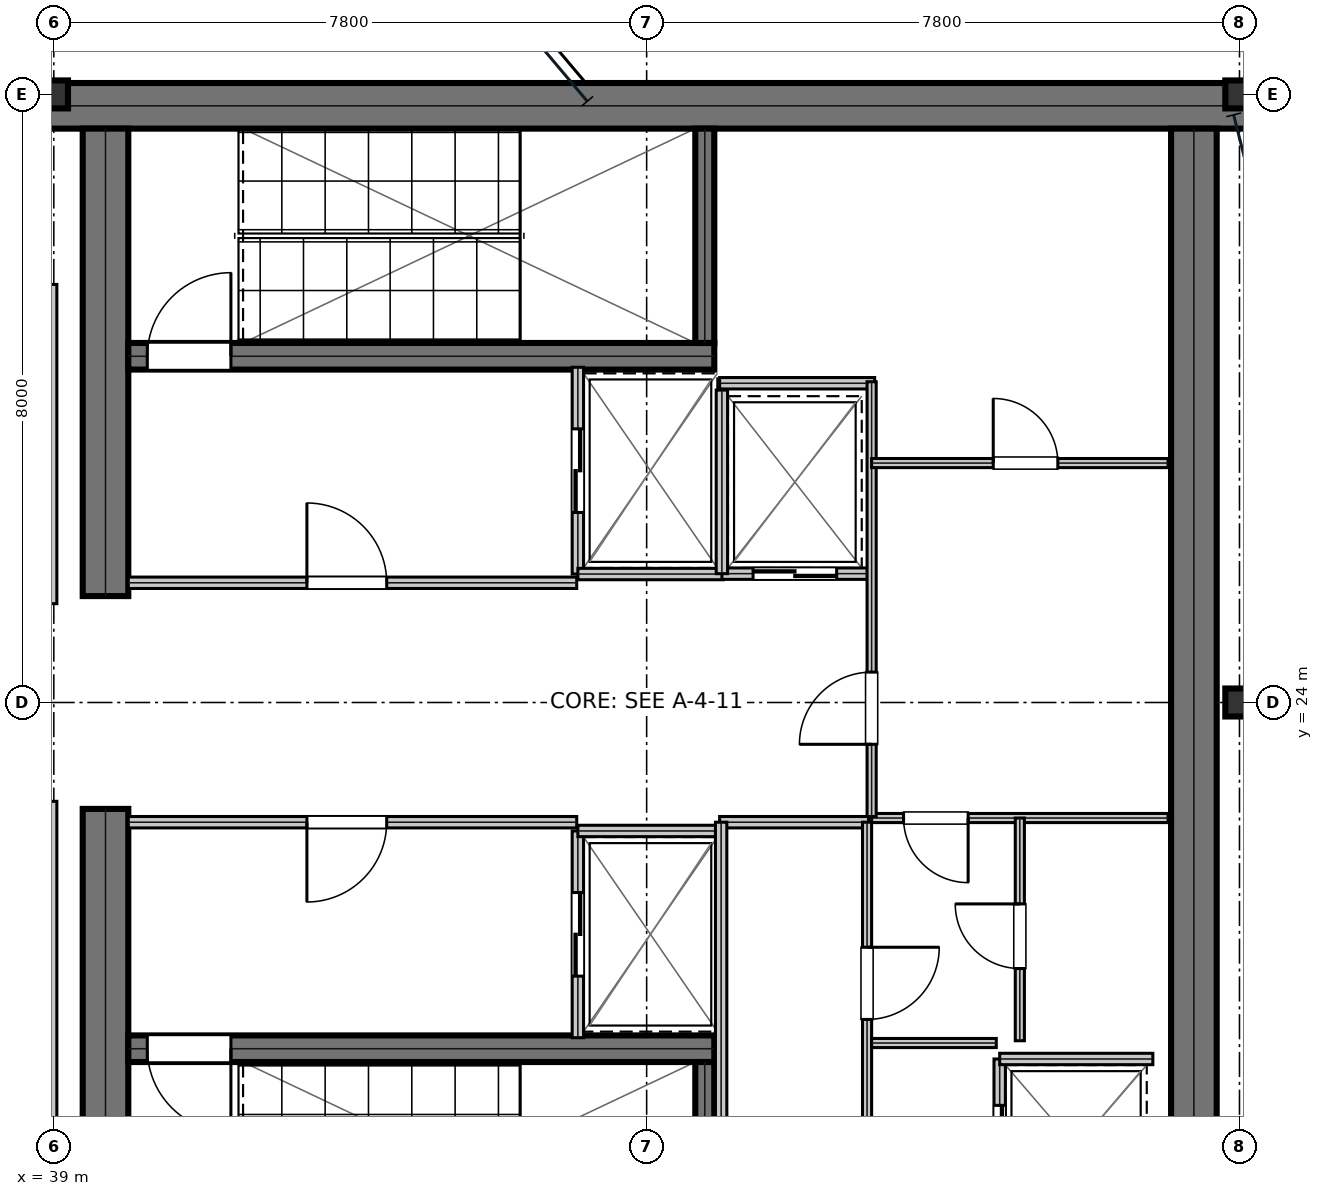
"""IFC4 building model, lengths in metres.
Left out: names, types, materials, properties, quantities, classifications, styles, units other than length and angle.
Written with IfcOpenShell. Run it as: python <this file> out.ifc"""

import sys

from ifc_helpers import new_model, si_unit, direction, frame, frame_2d, origin, origin_2d, place, context, subcontext, project, spatial, rectangle, i_section, extrude, element, fill, save


model = new_model("IFC4")
c1 = context("Model", 3, precision=1e-05, world=origin(), true_north=direction((0.0, 1.0)))
c2 = subcontext(c1, "Body", "Model", "MODEL_VIEW")
j1 = project(units=[si_unit("LENGTHUNIT", "METRE"), si_unit("PLANEANGLEUNIT", "RADIAN")], contexts=[c1])
p1 = place(None, origin())
s1 = spatial("IfcSite", under=j1, at=p1, CompositionType="ELEMENT")
p2 = place(p1, origin())
s2 = spatial("IfcBuilding", under=s1, at=p2, CompositionType="ELEMENT")
p3 = place(p2, frame((0.0, 0.0, 262.05)))
s3 = spatial("IfcBuildingStorey", under=s2, at=p3, CompositionType="ELEMENT", Elevation=262.05)
p4 = place(p3, frame((38.8, 31.85, 0.0), z_axis=(0.0, 0.0, 1.0), x_axis=(1.0, 0.0, 0.0)))
e1 = element("IfcWall", 1, at=p4, inside=s3, PredefinedType="SHEAR", context=c2, shape_type="SweptSolid", body=[
    extrude(rectangle(XDim=16.0, YDim=0.6, at=frame_2d((8.0, 0.0))), origin(), (0.0, 0.0, 1.0), 4.56),
])
for number, where, z_axis, x_axis in (
    (2, (39.68, 16.45, 0.0), (0.0, 0.0, 1.0), (0.0, 1.0, 0.0)),
    (3, (39.68, 25.4, 0.0), (0.0, 0.0, 1.0), (0.0, 1.0, 0.0)),
):
    element("IfcWall", number, at=place(p3, frame(where, z_axis=z_axis, x_axis=x_axis)), inside=s3, PredefinedType="SHEAR", context=c2, shape_type="SweptSolid", body=[
        extrude(rectangle(XDim=6.15, YDim=0.6, at=frame_2d((3.075, 0.0))), origin(), (0.0, 0.0, 1.0), 4.56),
    ])
p5 = place(p3, frame((54.0, 16.45, 0.0), z_axis=(0.0, 0.0, 1.0), x_axis=(0.0, 1.0, 0.0)))
e4 = element("IfcWall", 4, at=p5, inside=s3, PredefinedType="SHEAR", context=c2, shape_type="SweptSolid", body=[
    extrude(rectangle(XDim=15.1, YDim=0.6, at=frame_2d((7.55, 0.0))), origin(), (0.0, 0.0, 1.0), 4.56),
])
p6 = place(p3, frame((39.98, 28.555, 0.0), z_axis=(0.0, 0.0, 1.0), x_axis=(1.0, 0.0, 0.0)))
e5 = element("IfcWall", 5, at=p6, inside=s3, PredefinedType="SHEAR", context=c2, shape_type="SweptSolid", body=[
    extrude(rectangle(XDim=7.71, YDim=0.35, at=frame_2d((3.855, 0.0))), origin(), (0.0, 0.0, 1.0), 4.56),
])
p7 = place(p6, frame((0.25, 0.0, 0.0)))
e6 = element("IfcOpeningElement", 6, at=p7, cuts=e5, PredefinedType="OPENING", context=c2, shape_type="SweptSolid", body=[
    extrude(rectangle(XDim=1.1, YDim=2.15, at=frame_2d((0.55, 1.075))), frame((0.0, 0.185, 0.0), z_axis=(0.0, -1.0, 0.0), x_axis=(1.0, 0.0, 0.0)), (0.0, 0.0, 1.0), 0.37),
])
p8 = place(p3, frame((39.98, 19.445, 0.0), z_axis=(0.0, 0.0, 1.0), x_axis=(1.0, 0.0, 0.0)))
e7 = element("IfcWall", 7, at=p8, inside=s3, PredefinedType="SHEAR", context=c2, shape_type="SweptSolid", body=[
    extrude(rectangle(XDim=7.71, YDim=0.35, at=frame_2d((3.855, 0.0))), origin(), (0.0, 0.0, 1.0), 4.56),
])
p9 = place(p8, frame((0.25, 0.0, 0.0)))
e8 = element("IfcOpeningElement", 8, at=p9, cuts=e7, PredefinedType="OPENING", context=c2, shape_type="SweptSolid", body=[
    extrude(rectangle(XDim=1.1, YDim=2.15, at=frame_2d((0.55, 1.075))), frame((0.0, 0.185, 0.0), z_axis=(0.0, -1.0, 0.0), x_axis=(1.0, 0.0, 0.0)), (0.0, 0.0, 1.0), 0.37),
])
for number, where, z_axis, x_axis in (
    (9, (47.565, 28.73, 0.0), (0.0, 0.0, 1.0), (0.0, 1.0, 0.0)),
    (10, (47.565, 16.45, 0.0), (0.0, 0.0, 1.0), (0.0, 1.0, 0.0)),
):
    element("IfcWall", number, at=place(p3, frame(where, z_axis=z_axis, x_axis=x_axis)), inside=s3, PredefinedType="SHEAR", context=c2, shape_type="SweptSolid", body=[
        extrude(rectangle(XDim=2.82, YDim=0.25, at=frame_2d((1.41, 0.0))), origin(), (0.0, 0.0, 1.0), 4.56),
    ])
for number, where, z_axis, x_axis in (
    (11, (39.0, 32.0, 0.0), (0.0, 0.0, 1.0), (1.0, 0.0, 0.0)),
    (12, (54.6, 24.0, 0.0), (0.0, 0.0, 1.0), (1.0, 0.0, 0.0)),
    (13, (54.6, 32.0, 0.0), (0.0, 0.0, 1.0), (1.0, 0.0, 0.0)),
):
    element("IfcColumn", number, at=place(p3, frame(where, z_axis=z_axis, x_axis=x_axis)), inside=s3, PredefinedType="COLUMN", context=c2, shape_type="SweptSolid", body=[
        extrude(i_section(OverallWidth=0.373, OverallDepth=0.368, WebThickness=0.015, FlangeThickness=0.024, at=origin_2d()), origin(), (0.0, 0.0, 1.0), 4.794),
    ])
p10 = place(p3, frame((39.98, 25.575, 0.0), z_axis=(0.0, 0.0, 1.0), x_axis=(1.0, 0.0, 0.0)))
e14 = element("IfcWall", 14, at=p10, inside=s3, PredefinedType="PARTITIONING", context=c2, shape_type="SweptSolid", body=[
    extrude(rectangle(XDim=5.9, YDim=0.15, at=frame_2d((2.95, 0.0))), origin(), (0.0, 0.0, 1.0), 4.56),
])
p11 = place(p10, frame((2.35, 0.0, 0.0)))
e15 = element("IfcOpeningElement", 15, at=p11, cuts=e14, PredefinedType="OPENING", context=c2, shape_type="SweptSolid", body=[
    extrude(rectangle(XDim=1.05, YDim=2.15, at=frame_2d((0.525, 1.075))), frame((0.0, 0.085, 0.0), z_axis=(0.0, -1.0, 0.0), x_axis=(1.0, 0.0, 0.0)), (0.0, 0.0, 1.0), 0.17),
])
p12 = place(p3, frame((39.98, 22.425, 0.0), z_axis=(0.0, 0.0, 1.0), x_axis=(1.0, 0.0, 0.0)))
e16 = element("IfcWall", 16, at=p12, inside=s3, PredefinedType="PARTITIONING", context=c2, shape_type="SweptSolid", body=[
    extrude(rectangle(XDim=5.9, YDim=0.15, at=frame_2d((2.95, 0.0))), origin(), (0.0, 0.0, 1.0), 4.56),
])
p13 = place(p12, frame((2.35, 0.0, 0.0)))
e17 = element("IfcOpeningElement", 17, at=p13, cuts=e16, PredefinedType="OPENING", context=c2, shape_type="SweptSolid", body=[
    extrude(rectangle(XDim=1.05, YDim=2.15, at=frame_2d((0.525, 1.075))), frame((0.0, 0.085, 0.0), z_axis=(0.0, -1.0, 0.0), x_axis=(1.0, 0.0, 0.0)), (0.0, 0.0, 1.0), 0.17),
])
p14 = place(p3, frame((45.895, 25.69, 0.0), z_axis=(0.0, 0.0, 1.0), x_axis=(0.0, 1.0, 0.0)))
e18 = element("IfcWall", 18, at=p14, inside=s3, PredefinedType="PARTITIONING", context=c2, shape_type="SweptSolid", body=[
    extrude(rectangle(XDim=2.72, YDim=0.15, at=frame_2d((1.36, 0.0))), origin(), (0.0, 0.0, 1.0), 4.56),
])
p15 = place(p14, frame((0.81, 0.0, 0.0)))
e19 = element("IfcOpeningElement", 19, at=p15, cuts=e18, PredefinedType="OPENING", context=c2, shape_type="SweptSolid", body=[
    extrude(rectangle(XDim=1.1, YDim=2.15, at=frame_2d((0.55, 1.075))), frame((0.0, 0.085, 0.0), z_axis=(0.0, -1.0, 0.0), x_axis=(1.0, 0.0, 0.0)), (0.0, 0.0, 1.0), 0.17),
])
p16 = place(p3, frame((45.895, 25.69, 0.0), z_axis=(0.0, 0.0, 1.0), x_axis=(1.0, 0.0, 0.0)))
e20 = element("IfcWall", 20, at=p16, inside=s3, PredefinedType="PARTITIONING", context=c2, shape_type="SweptSolid", body=[
    extrude(rectangle(XDim=1.915, YDim=0.15, at=frame_2d((0.958, 0.0))), origin(), (0.0, 0.0, 1.0), 4.56),
])
p17 = place(p3, frame((45.895, 19.59, 0.0), z_axis=(0.0, 0.0, 1.0), x_axis=(0.0, 1.0, 0.0)))
e21 = element("IfcWall", 21, at=p17, inside=s3, PredefinedType="PARTITIONING", context=c2, shape_type="SweptSolid", body=[
    extrude(rectangle(XDim=2.72, YDim=0.15, at=frame_2d((1.36, 0.0))), origin(), (0.0, 0.0, 1.0), 4.56),
])
p18 = place(p17, frame((0.81, 0.0, 0.0)))
e22 = element("IfcOpeningElement", 22, at=p18, cuts=e21, PredefinedType="OPENING", context=c2, shape_type="SweptSolid", body=[
    extrude(rectangle(XDim=1.1, YDim=2.15, at=frame_2d((0.55, 1.075))), frame((0.0, 0.085, 0.0), z_axis=(0.0, -1.0, 0.0), x_axis=(1.0, 0.0, 0.0)), (0.0, 0.0, 1.0), 0.17),
])
p19 = place(p3, frame((45.895, 22.31, 0.0), z_axis=(0.0, 0.0, 1.0), x_axis=(1.0, 0.0, 0.0)))
e23 = element("IfcWall", 23, at=p19, inside=s3, PredefinedType="PARTITIONING", context=c2, shape_type="SweptSolid", body=[
    extrude(rectangle(XDim=1.915, YDim=0.15, at=frame_2d((0.958, 0.0))), origin(), (0.0, 0.0, 1.0), 4.56),
])
p20 = place(p3, frame((47.79, 25.695, 0.0), z_axis=(0.0, 0.0, 1.0), x_axis=(1.0, 0.0, 0.0)))
e24 = element("IfcWall", 24, at=p20, inside=s3, PredefinedType="PARTITIONING", context=c2, shape_type="SweptSolid", body=[
    extrude(rectangle(XDim=1.92, YDim=0.15, at=frame_2d((0.96, 0.0))), origin(), (0.0, 0.0, 1.0), 4.56),
])
p21 = place(p20, frame((0.41, 0.0, 0.0)))
e25 = element("IfcOpeningElement", 25, at=p21, cuts=e24, PredefinedType="OPENING", context=c2, shape_type="SweptSolid", body=[
    extrude(rectangle(XDim=1.1, YDim=2.15, at=frame_2d((0.55, 1.075))), frame((0.0, 0.085, 0.0), z_axis=(0.0, -1.0, 0.0), x_axis=(1.0, 0.0, 0.0)), (0.0, 0.0, 1.0), 0.17),
])
p22 = place(p3, frame((47.79, 25.695, 0.0), z_axis=(0.0, 0.0, 1.0), x_axis=(0.0, 1.0, 0.0)))
e26 = element("IfcWall", 26, at=p22, inside=s3, PredefinedType="PARTITIONING", context=c2, shape_type="SweptSolid", body=[
    extrude(rectangle(XDim=2.415, YDim=0.15, at=frame_2d((1.208, 0.0))), origin(), (0.0, 0.0, 1.0), 4.56),
])
p23 = place(p3, frame((51.445, 16.99, 0.0), z_axis=(0.0, 0.0, 1.0), x_axis=(0.0, 1.0, 0.0)))
e27 = element("IfcWall", 27, at=p23, inside=s3, PredefinedType="PARTITIONING", context=c2, shape_type="SweptSolid", body=[
    extrude(rectangle(XDim=2.32, YDim=0.15, at=frame_2d((1.16, 0.0))), origin(), (0.0, 0.0, 1.0), 4.56),
])
p24 = place(p23, frame((0.61, 0.0, 0.0)))
e28 = element("IfcOpeningElement", 28, at=p24, cuts=e27, PredefinedType="OPENING", context=c2, shape_type="SweptSolid", body=[
    extrude(rectangle(XDim=1.1, YDim=2.15, at=frame_2d((0.55, 1.075))), frame((0.0, 0.085, 0.0), z_axis=(0.0, -1.0, 0.0), x_axis=(1.0, 0.0, 0.0)), (0.0, 0.0, 1.0), 0.17),
])
p25 = place(p3, frame((51.445, 19.31, 0.0), z_axis=(0.0, 0.0, 1.0), x_axis=(1.0, 0.0, 0.0)))
e29 = element("IfcWall", 29, at=p25, inside=s3, PredefinedType="PARTITIONING", context=c2, shape_type="SweptSolid", body=[
    extrude(rectangle(XDim=2.015, YDim=0.15, at=frame_2d((1.007, 0.0))), origin(), (0.0, 0.0, 1.0), 4.56),
])
p26 = place(p3, frame((47.76, 22.425, 0.0), z_axis=(0.0, 0.0, 1.0), x_axis=(1.0, 0.0, 0.0)))
e30 = element("IfcWall", 30, at=p26, inside=s3, PredefinedType="PARTITIONING", context=c2, shape_type="SweptSolid", body=[
    extrude(rectangle(XDim=1.96, YDim=0.15, at=frame_2d((0.98, 0.0))), origin(), (0.0, 0.0, 1.0), 4.56),
])
p27 = place(p3, frame((47.78, 16.45, 0.0), z_axis=(0.0, 0.0, 1.0), x_axis=(0.0, 1.0, 0.0)))
e31 = element("IfcWall", 31, at=p27, inside=s3, PredefinedType="PARTITIONING", context=c2, shape_type="SweptSolid", body=[
    extrude(rectangle(XDim=5.975, YDim=0.15, at=frame_2d((2.988, 0.0))), origin(), (0.0, 0.0, 1.0), 4.56),
])
p28 = place(p3, frame((49.7, 16.48, 0.0), z_axis=(0.0, 0.0, 1.0), x_axis=(0.0, 1.0, 0.0)))
e32 = element("IfcWall", 32, at=p28, inside=s3, PredefinedType="PARTITIONING", context=c2, shape_type="SweptSolid", body=[
    extrude(rectangle(XDim=5.945, YDim=0.12, at=frame_2d((2.973, 0.0))), origin(), (0.0, 0.0, 1.0), 4.56),
])
p29 = place(p28, frame((3.35, 0.0, 0.0)))
e33 = element("IfcOpeningElement", 33, at=p29, cuts=e32, PredefinedType="OPENING", context=c2, shape_type="SweptSolid", body=[
    extrude(rectangle(XDim=0.95, YDim=2.15, at=frame_2d((0.475, 1.075))), frame((0.0, 0.07, 0.0), z_axis=(0.0, -1.0, 0.0), x_axis=(1.0, 0.0, 0.0)), (0.0, 0.0, 1.0), 0.14),
])
p30 = place(p3, frame((49.76, 22.48, 0.0), z_axis=(0.0, 0.0, 1.0), x_axis=(1.0, 0.0, 0.0)))
e34 = element("IfcWall", 34, at=p30, inside=s3, PredefinedType="PARTITIONING", context=c2, shape_type="SweptSolid", body=[
    extrude(rectangle(XDim=3.9, YDim=0.12, at=frame_2d((1.95, 0.0))), origin(), (0.0, 0.0, 1.0), 4.56),
])
p31 = place(p30, frame((0.42, 0.0, 0.0)))
e35 = element("IfcOpeningElement", 35, at=p31, cuts=e34, PredefinedType="OPENING", context=c2, shape_type="SweptSolid", body=[
    extrude(rectangle(XDim=0.85, YDim=2.15, at=frame_2d((0.425, 1.075))), frame((0.0, 0.07, 0.0), z_axis=(0.0, -1.0, 0.0), x_axis=(1.0, 0.0, 0.0)), (0.0, 0.0, 1.0), 0.14),
])
p32 = place(p3, frame((51.71, 19.55, 0.0), z_axis=(0.0, 0.0, 1.0), x_axis=(0.0, 1.0, 0.0)))
e36 = element("IfcWall", 36, at=p32, inside=s3, PredefinedType="PARTITIONING", context=c2, shape_type="SweptSolid", body=[
    extrude(rectangle(XDim=2.93, YDim=0.12, at=frame_2d((1.465, 0.0))), origin(), (0.0, 0.0, 1.0), 4.56),
])
p33 = place(p32, frame((0.95, 0.0, 0.0)))
e37 = element("IfcOpeningElement", 37, at=p33, cuts=e36, PredefinedType="OPENING", context=c2, shape_type="SweptSolid", body=[
    extrude(rectangle(XDim=0.85, YDim=2.15, at=frame_2d((0.425, 1.075))), frame((0.0, 0.07, 0.0), z_axis=(0.0, -1.0, 0.0), x_axis=(1.0, 0.0, 0.0)), (0.0, 0.0, 1.0), 0.14),
])
p34 = place(p3, frame((49.76, 19.52, 0.0), z_axis=(0.0, 0.0, 1.0), x_axis=(1.0, 0.0, 0.0)))
e38 = element("IfcWall", 38, at=p34, inside=s3, PredefinedType="PARTITIONING", context=c2, shape_type="SweptSolid", body=[
    extrude(rectangle(XDim=1.64, YDim=0.12, at=frame_2d((0.82, 0.0))), origin(), (0.0, 0.0, 1.0), 4.56),
])
p35 = place(p3, frame((47.76, 28.2, 0.0), z_axis=(0.0, 0.0, 1.0), x_axis=(1.0, 0.0, 0.0)))
e39 = element("IfcWall", 39, at=p35, inside=s3, PredefinedType="PARTITIONING", context=c2, shape_type="SweptSolid", body=[
    extrude(rectangle(XDim=2.04, YDim=0.15, at=frame_2d((1.02, 0.0))), origin(), (0.0, 0.0, 1.0), 4.56),
])
p36 = place(p3, frame((49.76, 22.5, 0.0), z_axis=(0.0, 0.0, 1.0), x_axis=(0.0, 1.0, 0.0)))
e40 = element("IfcWall", 40, at=p36, inside=s3, PredefinedType="PARTITIONING", context=c2, shape_type="SweptSolid", body=[
    extrude(rectangle(XDim=5.72, YDim=0.12, at=frame_2d((2.86, 0.0))), origin(), (0.0, 0.0, 1.0), 4.56),
])
p37 = place(p36, frame((0.95, 0.0, 0.0)))
e41 = element("IfcOpeningElement", 41, at=p37, cuts=e40, PredefinedType="OPENING", context=c2, shape_type="SweptSolid", body=[
    extrude(rectangle(XDim=0.95, YDim=2.15, at=frame_2d((0.475, 1.075))), frame((0.0, 0.07, 0.0), z_axis=(0.0, -1.0, 0.0), x_axis=(1.0, 0.0, 0.0)), (0.0, 0.0, 1.0), 0.14),
])
p38 = place(p3, frame((49.76, 27.15, 0.0), z_axis=(0.0, 0.0, 1.0), x_axis=(1.0, 0.0, 0.0)))
e42 = element("IfcWall", 42, at=p38, inside=s3, PredefinedType="PARTITIONING", context=c2, shape_type="SweptSolid", body=[
    extrude(rectangle(XDim=3.9, YDim=0.12, at=frame_2d((1.95, 0.0))), origin(), (0.0, 0.0, 1.0), 4.56),
])
p39 = place(p38, frame((1.6, 0.0, 0.0)))
e43 = element("IfcOpeningElement", 43, at=p39, cuts=e42, PredefinedType="OPENING", context=c2, shape_type="SweptSolid", body=[
    extrude(rectangle(XDim=0.85, YDim=2.15, at=frame_2d((0.425, 1.075))), frame((0.0, 0.07, 0.0), z_axis=(0.0, -1.0, 0.0), x_axis=(1.0, 0.0, 0.0)), (0.0, 0.0, 1.0), 0.14),
])
for number, where, z_axis, x_axis in (
    (44, (38.95, 18.5, 0.0), (0.0, 0.0, 1.0), (0.0, 1.0, 0.0)),
    (45, (38.95, 25.3, 0.0), (0.0, 0.0, 1.0), (0.0, 1.0, 0.0)),
):
    element("IfcWall", number, at=place(p3, frame(where, z_axis=z_axis, x_axis=x_axis)), inside=s3, PredefinedType="SOLIDWALL", context=c2, shape_type="SweptSolid", body=[
        extrude(rectangle(XDim=4.2, YDim=0.18, at=frame_2d((2.1, 0.0))), origin(), (0.0, 0.0, 1.0), 4.29),
    ])
p40 = place(p11, origin())
e46 = element("IfcDoor", 46, at=p40, inside=s3, OperationType="SINGLE_SWING_LEFT", PredefinedType="DOOR", context=c2, shape_type="SweptSolid", body=[
    extrude(rectangle(XDim=1.05, YDim=2.15, at=frame_2d((0.525, 1.075))), frame((0.0, 0.025, 0.0), z_axis=(0.0, -1.0, 0.0), x_axis=(1.0, 0.0, 0.0)), (0.0, 0.0, 1.0), 0.05),
])
fill(e15, e46)
p41 = place(p13, frame((1.05, 0.0, 0.0), z_axis=(0.0, 0.0, 1.0), x_axis=(-1.0, 0.0, 0.0)))
e47 = element("IfcDoor", 47, at=p41, inside=s3, OperationType="SINGLE_SWING_RIGHT", PredefinedType="DOOR", context=c2, shape_type="SweptSolid", body=[
    extrude(rectangle(XDim=1.05, YDim=2.15, at=frame_2d((0.525, 1.075))), frame((0.0, 0.025, 0.0), z_axis=(0.0, -1.0, 0.0), x_axis=(1.0, 0.0, 0.0)), (0.0, 0.0, 1.0), 0.05),
])
fill(e17, e47)
p42 = place(p15, frame((1.1, 0.0, 0.0), z_axis=(0.0, 0.0, 1.0), x_axis=(-1.0, 0.0, 0.0)))
e48 = element("IfcDoor", 48, at=p42, inside=s3, OperationType="DOUBLE_DOOR_SLIDING", PredefinedType="DOOR", context=c2, shape_type="SweptSolid", body=[
    extrude(rectangle(XDim=1.1, YDim=2.15, at=frame_2d((0.55, 1.075))), frame((0.0, 0.025, 0.0), z_axis=(0.0, -1.0, 0.0), x_axis=(1.0, 0.0, 0.0)), (0.0, 0.0, 1.0), 0.05),
])
fill(e19, e48)
p43 = place(p18, frame((1.1, 0.0, 0.0), z_axis=(0.0, 0.0, 1.0), x_axis=(-1.0, 0.0, 0.0)))
e49 = element("IfcDoor", 49, at=p43, inside=s3, OperationType="DOUBLE_DOOR_SLIDING", PredefinedType="DOOR", context=c2, shape_type="SweptSolid", body=[
    extrude(rectangle(XDim=1.1, YDim=2.15, at=frame_2d((0.55, 1.075))), frame((0.0, 0.025, 0.0), z_axis=(0.0, -1.0, 0.0), x_axis=(1.0, 0.0, 0.0)), (0.0, 0.0, 1.0), 0.05),
])
fill(e22, e49)
p44 = place(p21, frame((1.1, 0.0, 0.0), z_axis=(0.0, 0.0, 1.0), x_axis=(-1.0, 0.0, 0.0)))
e50 = element("IfcDoor", 50, at=p44, inside=s3, OperationType="DOUBLE_DOOR_SLIDING", PredefinedType="DOOR", context=c2, shape_type="SweptSolid", body=[
    extrude(rectangle(XDim=1.1, YDim=2.15, at=frame_2d((0.55, 1.075))), frame((0.0, 0.025, 0.0), z_axis=(0.0, -1.0, 0.0), x_axis=(1.0, 0.0, 0.0)), (0.0, 0.0, 1.0), 0.05),
])
fill(e25, e50)
p45 = place(p24, frame((1.1, 0.0, 0.0), z_axis=(0.0, 0.0, 1.0), x_axis=(-1.0, 0.0, 0.0)))
e51 = element("IfcDoor", 51, at=p45, inside=s3, OperationType="DOUBLE_DOOR_SLIDING", PredefinedType="DOOR", context=c2, shape_type="SweptSolid", body=[
    extrude(rectangle(XDim=1.1, YDim=2.15, at=frame_2d((0.55, 1.075))), frame((0.0, 0.025, 0.0), z_axis=(0.0, -1.0, 0.0), x_axis=(1.0, 0.0, 0.0)), (0.0, 0.0, 1.0), 0.05),
])
fill(e28, e51)
p46 = place(p29, frame((0.95, 0.0, 0.0), z_axis=(0.0, 0.0, 1.0), x_axis=(-1.0, 0.0, 0.0)))
e52 = element("IfcDoor", 52, at=p46, inside=s3, OperationType="SINGLE_SWING_LEFT", PredefinedType="DOOR", context=c2, shape_type="SweptSolid", body=[
    extrude(rectangle(XDim=0.95, YDim=2.15, at=frame_2d((0.475, 1.075))), frame((0.0, 0.025, 0.0), z_axis=(0.0, -1.0, 0.0), x_axis=(1.0, 0.0, 0.0)), (0.0, 0.0, 1.0), 0.05),
])
fill(e33, e52)
p47 = place(p31, frame((0.85, 0.0, 0.0), z_axis=(0.0, 0.0, 1.0), x_axis=(-1.0, 0.0, 0.0)))
e53 = element("IfcDoor", 53, at=p47, inside=s3, OperationType="SINGLE_SWING_LEFT", PredefinedType="DOOR", context=c2, shape_type="SweptSolid", body=[
    extrude(rectangle(XDim=0.85, YDim=2.15, at=frame_2d((0.425, 1.075))), frame((0.0, 0.025, 0.0), z_axis=(0.0, -1.0, 0.0), x_axis=(1.0, 0.0, 0.0)), (0.0, 0.0, 1.0), 0.05),
])
fill(e35, e53)
p48 = place(p33, origin())
e54 = element("IfcDoor", 54, at=p48, inside=s3, OperationType="SINGLE_SWING_RIGHT", PredefinedType="DOOR", context=c2, shape_type="SweptSolid", body=[
    extrude(rectangle(XDim=0.85, YDim=2.15, at=frame_2d((0.425, 1.075))), frame((0.0, 0.025, 0.0), z_axis=(0.0, -1.0, 0.0), x_axis=(1.0, 0.0, 0.0)), (0.0, 0.0, 1.0), 0.05),
])
fill(e37, e54)
p49 = place(p37, origin())
e55 = element("IfcDoor", 55, at=p49, inside=s3, OperationType="SINGLE_SWING_LEFT", PredefinedType="DOOR", context=c2, shape_type="SweptSolid", body=[
    extrude(rectangle(XDim=0.95, YDim=2.15, at=frame_2d((0.475, 1.075))), frame((0.0, 0.025, 0.0), z_axis=(0.0, -1.0, 0.0), x_axis=(1.0, 0.0, 0.0)), (0.0, 0.0, 1.0), 0.05),
])
fill(e41, e55)
p50 = place(p39, origin())
e56 = element("IfcDoor", 56, at=p50, inside=s3, OperationType="SINGLE_SWING_LEFT", PredefinedType="DOOR", context=c2, shape_type="SweptSolid", body=[
    extrude(rectangle(XDim=0.85, YDim=2.15, at=frame_2d((0.425, 1.075))), frame((0.0, 0.025, 0.0), z_axis=(0.0, -1.0, 0.0), x_axis=(1.0, 0.0, 0.0)), (0.0, 0.0, 1.0), 0.05),
])
fill(e43, e56)
p51 = place(p7, origin())
e57 = element("IfcDoor", 57, at=p51, inside=s3, OperationType="SINGLE_SWING_RIGHT", PredefinedType="DOOR", context=c2, shape_type="SweptSolid", body=[
    extrude(rectangle(XDim=1.1, YDim=2.15, at=frame_2d((0.55, 1.075))), frame((0.0, 0.025, 0.0), z_axis=(0.0, -1.0, 0.0), x_axis=(1.0, 0.0, 0.0)), (0.0, 0.0, 1.0), 0.05),
])
fill(e6, e57)
p52 = place(p9, frame((1.1, 0.0, 0.0), z_axis=(0.0, 0.0, 1.0), x_axis=(-1.0, 0.0, 0.0)))
e58 = element("IfcDoor", 58, at=p52, inside=s3, OperationType="SINGLE_SWING_LEFT", PredefinedType="DOOR", context=c2, shape_type="SweptSolid", body=[
    extrude(rectangle(XDim=1.1, YDim=2.15, at=frame_2d((0.55, 1.075))), frame((0.0, 0.025, 0.0), z_axis=(0.0, -1.0, 0.0), x_axis=(1.0, 0.0, 0.0)), (0.0, 0.0, 1.0), 0.05),
])
fill(e8, e58)
save(model, sys.argv[1])
